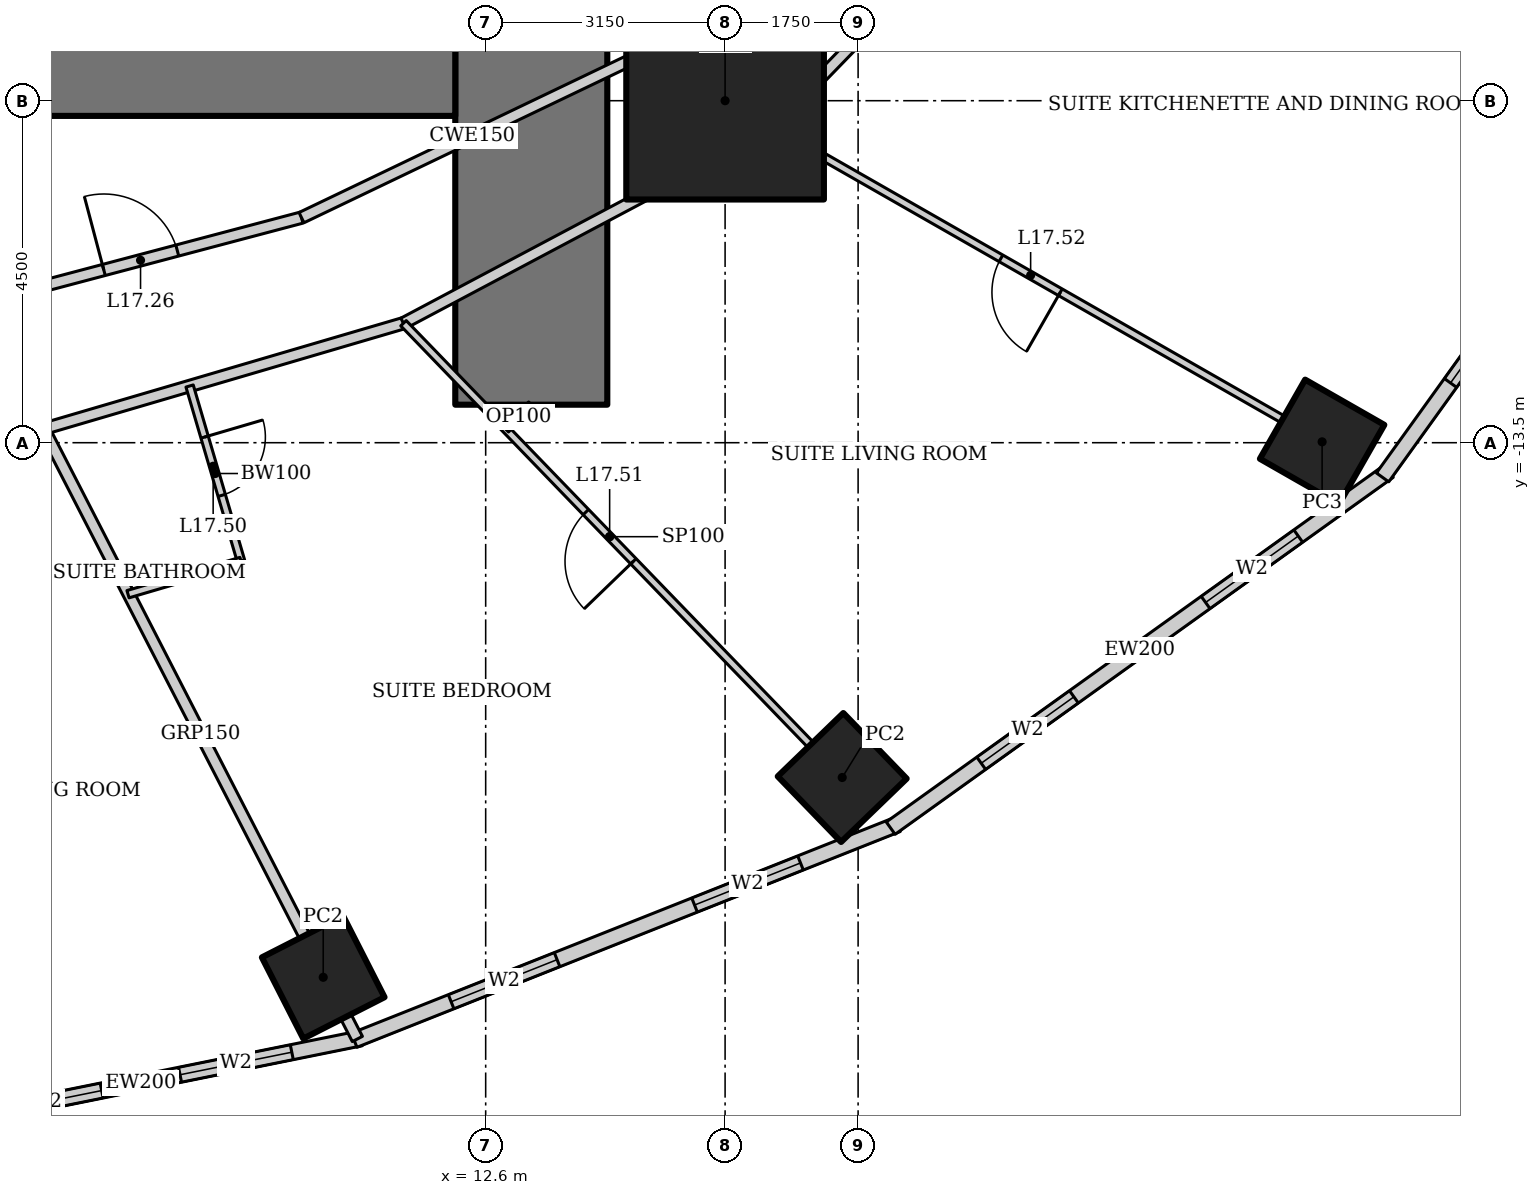
"""IFC4 building model, lengths in metres.
Left out: names, types, materials, properties, quantities, classifications, styles, units other than length and angle.
Written with IfcOpenShell. Run it as: python <this file> out.ifc"""

import sys

from ifc_helpers import new_model, si_unit, direction, frame, frame_2d, origin, origin_2d, place, context, subcontext, project, spatial, rectangle, hollow_rectangle, extrude, element, fill, save


model = new_model("IFC4")
c1 = context("Model", 3, precision=1e-05, world=origin(), true_north=direction((0.0, 1.0)))
c2 = subcontext(c1, "Body", "Model", "MODEL_VIEW")
j1 = project(units=[si_unit("LENGTHUNIT", "METRE"), si_unit("PLANEANGLEUNIT", "RADIAN")], contexts=[c1])
p1 = place(None, origin())
s1 = spatial("IfcSite", under=j1, at=p1, CompositionType="ELEMENT")
p2 = place(p1, origin())
s2 = spatial("IfcBuilding", under=s1, at=p2, CompositionType="ELEMENT")
p3 = place(p2, frame((0.0, 0.0, 76.6)))
s3 = spatial("IfcBuildingStorey", under=s2, at=p3, CompositionType="ELEMENT", Elevation=76.6)
p4 = place(p3, frame((15.75, -9.0, 0.0), z_axis=(0.0, 0.0, 1.0), x_axis=(1.0, 0.0, 0.0)))
e1 = element("IfcColumn", 1, at=p4, inside=s3, PredefinedType="COLUMN", context=c2, shape_type="SweptSolid", body=[
    extrude(hollow_rectangle(XDim=2.6, YDim=2.6, WallThickness=0.13, at=origin_2d()), origin(), (0.0, 0.0, 1.0), 3.6),
])
for number, where, z_axis, x_axis in (
    (2, (10.463, -20.534, 0.0), (0.0, 0.0, 1.0), (0.891, 0.454, 0.0)),
    (3, (17.291, -17.905, 0.0), (0.0, 0.0, 1.0), (0.719, 0.695, 0.0)),
):
    element("IfcColumn", number, at=place(p3, frame(where, z_axis=z_axis, x_axis=x_axis)), inside=s3, PredefinedType="COLUMN", context=c2, shape_type="SweptSolid", body=[
        extrude(hollow_rectangle(XDim=1.2, YDim=1.2, WallThickness=0.1, at=origin_2d()), origin(), (0.0, 0.0, 1.0), 3.6),
    ])
p5 = place(p3, frame((23.605, -13.489, 0.0), z_axis=(0.0, 0.0, 1.0), x_axis=(0.496139221777, 0.86824298017, 0.0)))
e4 = element("IfcColumn", 4, at=p5, inside=s3, PredefinedType="COLUMN", context=c2, shape_type="SweptSolid", body=[
    extrude(hollow_rectangle(XDim=1.2, YDim=1.2, WallThickness=0.12, at=origin_2d()), origin(), (0.0, 0.0, 1.0), 3.6),
])
p6 = place(p3, frame((13.2, -13.0, 0.0), z_axis=(0.0, 0.0, 1.0), x_axis=(0.0, 1.0, 0.0)))
e5 = element("IfcWall", 5, at=p6, inside=s3, PredefinedType="SHEAR", context=c2, shape_type="SweptSolid", body=[
    extrude(rectangle(XDim=26.0, YDim=2.0, at=frame_2d((13.0, 0.0))), origin(), (0.0, 0.0, 1.0), 3.6),
])
p7 = place(p6, frame((12.1, 0.0, 0.0)))
e6 = element("IfcOpeningElement", 6, at=p7, cuts=e5, PredefinedType="OPENING", context=c2, shape_type="SweptSolid", body=[
    extrude(rectangle(XDim=1.8, YDim=2.1, at=frame_2d((0.9, 1.05))), frame((0.0, 1.01, 0.0), z_axis=(0.0, -1.0, 0.0), x_axis=(1.0, 0.0, 0.0)), (0.0, 0.0, 1.0), 2.02),
])
p8 = place(p3, frame((-12.2, -8.0, 0.0), z_axis=(0.0, 0.0, 1.0), x_axis=(1.0, 0.0, 0.0)))
e7 = element("IfcWall", 7, at=p8, inside=s3, PredefinedType="SHEAR", context=c2, shape_type="SweptSolid", body=[
    extrude(rectangle(XDim=24.4, YDim=2.4, at=frame_2d((12.2, 0.0))), origin(), (0.0, 0.0, 1.0), 3.6),
])
p9 = place(p3, frame((5.17, -22.504, 0.0), z_axis=(0.0, 0.0, 1.0), x_axis=(0.980251657452, 0.197754110105, 0.0)))
e8 = element("IfcWall", 8, at=p9, inside=s3, PredefinedType="SOLIDWALL", context=c2, shape_type="SweptSolid", body=[
    extrude(rectangle(XDim=5.904, YDim=0.2, at=frame_2d((2.952, 0.0))), origin(), (0.0, 0.0, 1.0), 3.45),
])
p10 = place(p9, frame((0.926, 0.0, 0.5)))
e9 = element("IfcOpeningElement", 9, at=p10, cuts=e8, PredefinedType="OPENING", context=c2, shape_type="SweptSolid", body=[
    extrude(rectangle(XDim=1.5, YDim=2.2, at=frame_2d((0.75, 1.1))), frame((0.0, 0.11, 0.0), z_axis=(0.0, -1.0, 0.0), x_axis=(1.0, 0.0, 0.0)), (0.0, 0.0, 1.0), 0.22),
])
p11 = place(p9, frame((3.478, 0.0, 0.5)))
e10 = element("IfcOpeningElement", 10, at=p11, cuts=e8, PredefinedType="OPENING", context=c2, shape_type="SweptSolid", body=[
    extrude(rectangle(XDim=1.5, YDim=2.2, at=frame_2d((0.75, 1.1))), frame((0.0, 0.11, 0.0), z_axis=(0.0, -1.0, 0.0), x_axis=(1.0, 0.0, 0.0)), (0.0, 0.0, 1.0), 0.22),
])
p12 = place(p3, frame((10.869, -21.363, 0.0), z_axis=(0.0, 0.0, 1.0), x_axis=(0.929358351251, 0.369178892895, 0.0)))
e11 = element("IfcWall", 11, at=p12, inside=s3, PredefinedType="SOLIDWALL", context=c2, shape_type="SweptSolid", body=[
    extrude(rectangle(XDim=7.692, YDim=0.2, at=frame_2d((3.846, 0.0))), origin(), (0.0, 0.0, 1.0), 3.45),
])
p13 = place(p12, frame((1.373, 0.0, 0.5)))
e12 = element("IfcOpeningElement", 12, at=p13, cuts=e11, PredefinedType="OPENING", context=c2, shape_type="SweptSolid", body=[
    extrude(rectangle(XDim=1.5, YDim=2.2, at=frame_2d((0.75, 1.1))), frame((0.0, 0.11, 0.0), z_axis=(0.0, -1.0, 0.0), x_axis=(1.0, 0.0, 0.0)), (0.0, 0.0, 1.0), 0.22),
])
p14 = place(p12, frame((4.819, 0.0, 0.5)))
e13 = element("IfcOpeningElement", 13, at=p14, cuts=e11, PredefinedType="OPENING", context=c2, shape_type="SweptSolid", body=[
    extrude(rectangle(XDim=1.5, YDim=2.2, at=frame_2d((0.75, 1.1))), frame((0.0, 0.11, 0.0), z_axis=(0.0, -1.0, 0.0), x_axis=(1.0, 0.0, 0.0)), (0.0, 0.0, 1.0), 0.22),
])
p15 = place(p3, frame((17.929, -18.572, 0.0), z_axis=(0.0, 0.0, 1.0), x_axis=(0.812791321576, 0.582554948112, 0.0)))
e14 = element("IfcWall", 14, at=p15, inside=s3, PredefinedType="SOLIDWALL", context=c2, shape_type="SweptSolid", body=[
    extrude(rectangle(XDim=8.063, YDim=0.2, at=frame_2d((4.032, 0.0))), origin(), (0.0, 0.0, 1.0), 3.45),
])
p16 = place(p15, frame((1.466, 0.0, 0.5)))
e15 = element("IfcOpeningElement", 15, at=p16, cuts=e14, PredefinedType="OPENING", context=c2, shape_type="SweptSolid", body=[
    extrude(rectangle(XDim=1.5, YDim=2.2, at=frame_2d((0.75, 1.1))), frame((0.0, 0.11, 0.0), z_axis=(0.0, -1.0, 0.0), x_axis=(1.0, 0.0, 0.0)), (0.0, 0.0, 1.0), 0.22),
])
p17 = place(p15, frame((5.097, 0.0, 0.5)))
e16 = element("IfcOpeningElement", 16, at=p17, cuts=e14, PredefinedType="OPENING", context=c2, shape_type="SweptSolid", body=[
    extrude(rectangle(XDim=1.5, YDim=2.2, at=frame_2d((0.75, 1.1))), frame((0.0, 0.11, 0.0), z_axis=(0.0, -1.0, 0.0), x_axis=(1.0, 0.0, 0.0)), (0.0, 0.0, 1.0), 0.22),
])
p18 = place(p3, frame((24.4, -13.957, 0.0), z_axis=(0.0, 0.0, 1.0), x_axis=(0.583937613703, 0.811798536155, 0.0)))
e17 = element("IfcWall", 17, at=p18, inside=s3, PredefinedType="SOLIDWALL", context=c2, shape_type="SweptSolid", body=[
    extrude(rectangle(XDim=8.323, YDim=0.2, at=frame_2d((4.162, 0.0))), origin(), (0.0, 0.0, 1.0), 3.45),
])
p19 = place(p18, frame((1.531, 0.0, 0.5)))
e18 = element("IfcOpeningElement", 18, at=p19, cuts=e17, PredefinedType="OPENING", context=c2, shape_type="SweptSolid", body=[
    extrude(rectangle(XDim=1.5, YDim=2.2, at=frame_2d((0.75, 1.1))), frame((0.0, 0.11, 0.0), z_axis=(0.0, -1.0, 0.0), x_axis=(1.0, 0.0, 0.0)), (0.0, 0.0, 1.0), 0.22),
])
p20 = place(p18, frame((5.292, 0.0, 0.5)))
e19 = element("IfcOpeningElement", 19, at=p20, cuts=e17, PredefinedType="OPENING", context=c2, shape_type="SweptSolid", body=[
    extrude(rectangle(XDim=1.5, YDim=2.2, at=frame_2d((0.75, 1.1))), frame((0.0, 0.11, 0.0), z_axis=(0.0, -1.0, 0.0), x_axis=(1.0, 0.0, 0.0)), (0.0, 0.0, 1.0), 0.22),
])
p21 = place(p3, frame((10.912, -21.346, 0.0), z_axis=(0.0, 0.0, 1.0), x_axis=(-0.457117602022, 0.889406261458, 0.0)))
e20 = element("IfcWall", 20, at=p21, inside=s3, PredefinedType="PARTITIONING", context=c2, shape_type="SweptSolid", body=[
    extrude(rectangle(XDim=9.027, YDim=0.15, at=frame_2d((4.513, 0.0))), origin(), (0.0, 0.0, 1.0), 2.528),
])
p22 = place(p3, frame((6.786, -13.317, 0.0), z_axis=(0.0, 0.0, 1.0), x_axis=(0.959496227294, 0.281721475589, 0.0)))
e21 = element("IfcWall", 21, at=p22, inside=s3, PredefinedType="PARTITIONING", context=c2, shape_type="SweptSolid", body=[
    extrude(rectangle(XDim=4.933, YDim=0.15, at=frame_2d((2.466, 0.0))), origin(), (0.0, 0.0, 1.0), 3.45),
])
p23 = place(p3, frame((11.519, -11.928, 0.0), z_axis=(0.0, 0.0, 1.0), x_axis=(0.883334368785, 0.468743419071, 0.0)))
e22 = element("IfcWall", 22, at=p23, inside=s3, PredefinedType="PARTITIONING", context=c2, shape_type="SweptSolid", body=[
    extrude(rectangle(XDim=5.491, YDim=0.15, at=frame_2d((2.746, 0.0))), origin(), (0.0, 0.0, 1.0), 3.45),
])
p24 = place(p3, frame((16.369, -9.354, 0.0), z_axis=(0.0, 0.0, 1.0), x_axis=(0.695871090686, 0.71816671125, 0.0)))
e23 = element("IfcWall", 23, at=p24, inside=s3, PredefinedType="PARTITIONING", context=c2, shape_type="SweptSolid", body=[
    extrude(rectangle(XDim=5.913, YDim=0.15, at=frame_2d((2.957, 0.0))), origin(), (0.0, 0.0, 1.0), 3.45),
])
p25 = place(p24, frame((4.863, 0.0, 0.0)))
e24 = element("IfcOpeningElement", 24, at=p25, cuts=e23, PredefinedType="OPENING", context=c2, shape_type="SweptSolid", body=[
    extrude(rectangle(XDim=0.9, YDim=2.1, at=frame_2d((0.45, 1.05))), frame((0.0, 0.085, 0.0), z_axis=(0.0, -1.0, 0.0), x_axis=(1.0, 0.0, 0.0)), (0.0, 0.0, 1.0), 0.17),
])
p26 = place(p3, frame((5.941, -11.66, 0.0), z_axis=(0.0, 0.0, 1.0), x_axis=(0.966672790407, 0.256015070428, 0.0)))
e25 = element("IfcWall", 25, at=p26, inside=s3, PredefinedType="PARTITIONING", context=c2, shape_type="SweptSolid", body=[
    extrude(rectangle(XDim=4.382, YDim=0.15, at=frame_2d((2.191, 0.0))), origin(), (0.0, 0.0, 1.0), 3.45),
])
p27 = place(p26, frame((1.691, 0.0, 0.0)))
e26 = element("IfcOpeningElement", 26, at=p27, cuts=e25, PredefinedType="OPENING", context=c2, shape_type="SweptSolid", body=[
    extrude(rectangle(XDim=1.0, YDim=2.1, at=frame_2d((0.5, 1.05))), frame((0.0, 0.085, 0.0), z_axis=(0.0, -1.0, 0.0), x_axis=(1.0, 0.0, 0.0)), (0.0, 0.0, 1.0), 0.17),
])
p28 = place(p3, frame((10.177, -10.539, 0.0), z_axis=(0.0, 0.0, 1.0), x_axis=(0.901869692799, 0.43200816799, 0.0)))
e27 = element("IfcWall", 27, at=p28, inside=s3, PredefinedType="PARTITIONING", context=c2, shape_type="SweptSolid", body=[
    extrude(rectangle(XDim=4.986, YDim=0.15, at=frame_2d((2.493, 0.0))), origin(), (0.0, 0.0, 1.0), 3.45),
])
p29 = place(p3, frame((14.673, -8.385, 0.0), z_axis=(0.0, 0.0, 1.0), x_axis=(0.731260145007, 0.682098673452, 0.0)))
e28 = element("IfcWall", 28, at=p29, inside=s3, PredefinedType="PARTITIONING", context=c2, shape_type="SweptSolid", body=[
    extrude(rectangle(XDim=5.468, YDim=0.15, at=frame_2d((2.734, 0.0))), origin(), (0.0, 0.0, 1.0), 3.45),
])
p30 = place(p29, frame((2.234, 0.0, 0.0)))
e29 = element("IfcOpeningElement", 29, at=p30, cuts=e28, PredefinedType="OPENING", context=c2, shape_type="SweptSolid", body=[
    extrude(rectangle(XDim=1.0, YDim=2.1, at=frame_2d((0.5, 1.05))), frame((0.0, 0.085, 0.0), z_axis=(0.0, -1.0, 0.0), x_axis=(1.0, 0.0, 0.0)), (0.0, 0.0, 1.0), 0.17),
])
p31 = place(p3, frame((8.705, -12.754, 0.0), z_axis=(0.0, 0.0, 1.0), x_axis=(0.281659633817, -0.959514382736, 0.0)))
e30 = element("IfcWall", 30, at=p31, inside=s3, PredefinedType="PARTITIONING", context=c2, shape_type="SweptSolid", body=[
    extrude(rectangle(XDim=2.4, YDim=0.1, at=frame_2d((1.2, 0.0))), origin(), (0.0, 0.0, 1.0), 3.45),
])
p32 = place(p31, frame((0.7, 0.0, 0.0)))
e31 = element("IfcOpeningElement", 31, at=p32, cuts=e30, PredefinedType="OPENING", context=c2, shape_type="SweptSolid", body=[
    extrude(rectangle(XDim=0.8, YDim=2.1, at=frame_2d((0.4, 1.05))), frame((0.0, 0.06, 0.0), z_axis=(0.0, -1.0, 0.0), x_axis=(1.0, 0.0, 0.0)), (0.0, 0.0, 1.0), 0.12),
])
p33 = place(p3, frame((9.381, -15.057, 0.0), z_axis=(0.0, 0.0, 1.0), x_axis=(-0.959518451093, -0.281645773999, 0.0)))
e32 = element("IfcWall", 32, at=p33, inside=s3, PredefinedType="PARTITIONING", context=c2, shape_type="SweptSolid", body=[
    extrude(rectangle(XDim=1.549, YDim=0.1, at=frame_2d((0.774, 0.0))), origin(), (0.0, 0.0, 1.0), 3.45),
])
p34 = place(p3, frame((16.944, -17.545, 0.0), z_axis=(0.0, 0.0, 1.0), x_axis=(-0.694666479492, 0.719331969448, 0.0)))
e33 = element("IfcWall", 33, at=p34, inside=s3, PredefinedType="PARTITIONING", context=c2, shape_type="SweptSolid", body=[
    extrude(rectangle(XDim=7.81, YDim=0.1, at=frame_2d((3.905, 0.0))), origin(), (0.0, 0.0, 1.0), 2.528),
])
p35 = place(p34, frame((3.455, 0.0, 0.0)))
e34 = element("IfcOpeningElement", 34, at=p35, cuts=e33, PredefinedType="OPENING", context=c2, shape_type="SweptSolid", body=[
    extrude(rectangle(XDim=0.9, YDim=2.1, at=frame_2d((0.45, 1.05))), frame((0.0, 0.06, 0.0), z_axis=(0.0, -1.0, 0.0), x_axis=(1.0, 0.0, 0.0)), (0.0, 0.0, 1.0), 0.12),
])
p36 = place(p3, frame((23.171, -13.24, 0.0), z_axis=(0.0, 0.0, 1.0), x_axis=(-0.868243142124, 0.496138938357, 0.0)))
e35 = element("IfcWall", 35, at=p36, inside=s3, PredefinedType="PARTITIONING", context=c2, shape_type="SweptSolid", body=[
    extrude(rectangle(XDim=7.834, YDim=0.1, at=frame_2d((3.917, 0.0))), origin(), (0.0, 0.0, 1.0), 2.693),
])
p37 = place(p36, frame((3.467, 0.0, 0.0)))
e36 = element("IfcOpeningElement", 36, at=p37, cuts=e35, PredefinedType="OPENING", context=c2, shape_type="SweptSolid", body=[
    extrude(rectangle(XDim=0.9, YDim=2.1, at=frame_2d((0.45, 1.05))), frame((0.0, 0.06, 0.0), z_axis=(0.0, -1.0, 0.0), x_axis=(1.0, 0.0, 0.0)), (0.0, 0.0, 1.0), 0.12),
])
p38 = place(p3, frame((13.2, -13.0, 0.0), z_axis=(0.0, 0.0, 1.0), x_axis=(-0.719347134512, -0.69465077562, 0.0)))
e37 = element("IfcWall", 37, at=p38, inside=s3, PredefinedType="PARTITIONING", context=c2, shape_type="SweptSolid", body=[
    extrude(rectangle(XDim=0.465, YDim=0.1, at=frame_2d((0.232, 0.0))), origin(), (0.0, 0.0, 1.0), 3.45),
])
p39 = place(p10, origin())
e38 = element("IfcWindow", 38, at=p39, inside=s3, PartitioningType="SINGLE_PANEL", PredefinedType="WINDOW", context=c2, shape_type="SweptSolid", body=[
    extrude(rectangle(XDim=1.5, YDim=2.2, at=frame_2d((0.75, 1.1))), frame((0.0, 0.03, 0.0), z_axis=(0.0, -1.0, 0.0), x_axis=(1.0, 0.0, 0.0)), (0.0, 0.0, 1.0), 0.06),
])
fill(e9, e38)
p40 = place(p11, origin())
e39 = element("IfcWindow", 39, at=p40, inside=s3, PartitioningType="SINGLE_PANEL", PredefinedType="WINDOW", context=c2, shape_type="SweptSolid", body=[
    extrude(rectangle(XDim=1.5, YDim=2.2, at=frame_2d((0.75, 1.1))), frame((0.0, 0.03, 0.0), z_axis=(0.0, -1.0, 0.0), x_axis=(1.0, 0.0, 0.0)), (0.0, 0.0, 1.0), 0.06),
])
fill(e10, e39)
p41 = place(p13, origin())
e40 = element("IfcWindow", 40, at=p41, inside=s3, PartitioningType="SINGLE_PANEL", PredefinedType="WINDOW", context=c2, shape_type="SweptSolid", body=[
    extrude(rectangle(XDim=1.5, YDim=2.2, at=frame_2d((0.75, 1.1))), frame((0.0, 0.03, 0.0), z_axis=(0.0, -1.0, 0.0), x_axis=(1.0, 0.0, 0.0)), (0.0, 0.0, 1.0), 0.06),
])
fill(e12, e40)
p42 = place(p14, origin())
e41 = element("IfcWindow", 41, at=p42, inside=s3, PartitioningType="SINGLE_PANEL", PredefinedType="WINDOW", context=c2, shape_type="SweptSolid", body=[
    extrude(rectangle(XDim=1.5, YDim=2.2, at=frame_2d((0.75, 1.1))), frame((0.0, 0.03, 0.0), z_axis=(0.0, -1.0, 0.0), x_axis=(1.0, 0.0, 0.0)), (0.0, 0.0, 1.0), 0.06),
])
fill(e13, e41)
p43 = place(p16, origin())
e42 = element("IfcWindow", 42, at=p43, inside=s3, PartitioningType="SINGLE_PANEL", PredefinedType="WINDOW", context=c2, shape_type="SweptSolid", body=[
    extrude(rectangle(XDim=1.5, YDim=2.2, at=frame_2d((0.75, 1.1))), frame((0.0, 0.03, 0.0), z_axis=(0.0, -1.0, 0.0), x_axis=(1.0, 0.0, 0.0)), (0.0, 0.0, 1.0), 0.06),
])
fill(e15, e42)
p44 = place(p17, origin())
e43 = element("IfcWindow", 43, at=p44, inside=s3, PartitioningType="SINGLE_PANEL", PredefinedType="WINDOW", context=c2, shape_type="SweptSolid", body=[
    extrude(rectangle(XDim=1.5, YDim=2.2, at=frame_2d((0.75, 1.1))), frame((0.0, 0.03, 0.0), z_axis=(0.0, -1.0, 0.0), x_axis=(1.0, 0.0, 0.0)), (0.0, 0.0, 1.0), 0.06),
])
fill(e16, e43)
p45 = place(p19, origin())
e44 = element("IfcWindow", 44, at=p45, inside=s3, PartitioningType="SINGLE_PANEL", PredefinedType="WINDOW", context=c2, shape_type="SweptSolid", body=[
    extrude(rectangle(XDim=1.5, YDim=2.2, at=frame_2d((0.75, 1.1))), frame((0.0, 0.03, 0.0), z_axis=(0.0, -1.0, 0.0), x_axis=(1.0, 0.0, 0.0)), (0.0, 0.0, 1.0), 0.06),
])
fill(e18, e44)
p46 = place(p27, origin())
e45 = element("IfcDoor", 45, at=p46, inside=s3, OperationType="SINGLE_SWING_LEFT", PredefinedType="DOOR", context=c2, shape_type="SweptSolid", body=[
    extrude(rectangle(XDim=1.0, YDim=2.1, at=frame_2d((0.5, 1.05))), frame((0.0, 0.025, 0.0), z_axis=(0.0, -1.0, 0.0), x_axis=(1.0, 0.0, 0.0)), (0.0, 0.0, 1.0), 0.05),
])
fill(e26, e45)
p47 = place(p32, origin())
e46 = element("IfcDoor", 46, at=p47, inside=s3, OperationType="SINGLE_SWING_LEFT", PredefinedType="DOOR", context=c2, shape_type="SweptSolid", body=[
    extrude(rectangle(XDim=0.8, YDim=2.1, at=frame_2d((0.4, 1.05))), frame((0.0, 0.025, 0.0), z_axis=(0.0, -1.0, 0.0), x_axis=(1.0, 0.0, 0.0)), (0.0, 0.0, 1.0), 0.05),
])
fill(e31, e46)
p48 = place(p35, origin())
e47 = element("IfcDoor", 47, at=p48, inside=s3, OperationType="SINGLE_SWING_LEFT", PredefinedType="DOOR", context=c2, shape_type="SweptSolid", body=[
    extrude(rectangle(XDim=0.9, YDim=2.1, at=frame_2d((0.45, 1.05))), frame((0.0, 0.025, 0.0), z_axis=(0.0, -1.0, 0.0), x_axis=(1.0, 0.0, 0.0)), (0.0, 0.0, 1.0), 0.05),
])
fill(e34, e47)
p49 = place(p37, origin())
e48 = element("IfcDoor", 48, at=p49, inside=s3, OperationType="SINGLE_SWING_LEFT", PredefinedType="DOOR", context=c2, shape_type="SweptSolid", body=[
    extrude(rectangle(XDim=0.9, YDim=2.1, at=frame_2d((0.45, 1.05))), frame((0.0, 0.025, 0.0), z_axis=(0.0, -1.0, 0.0), x_axis=(1.0, 0.0, 0.0)), (0.0, 0.0, 1.0), 0.05),
])
fill(e36, e48)
save(model, sys.argv[1])
